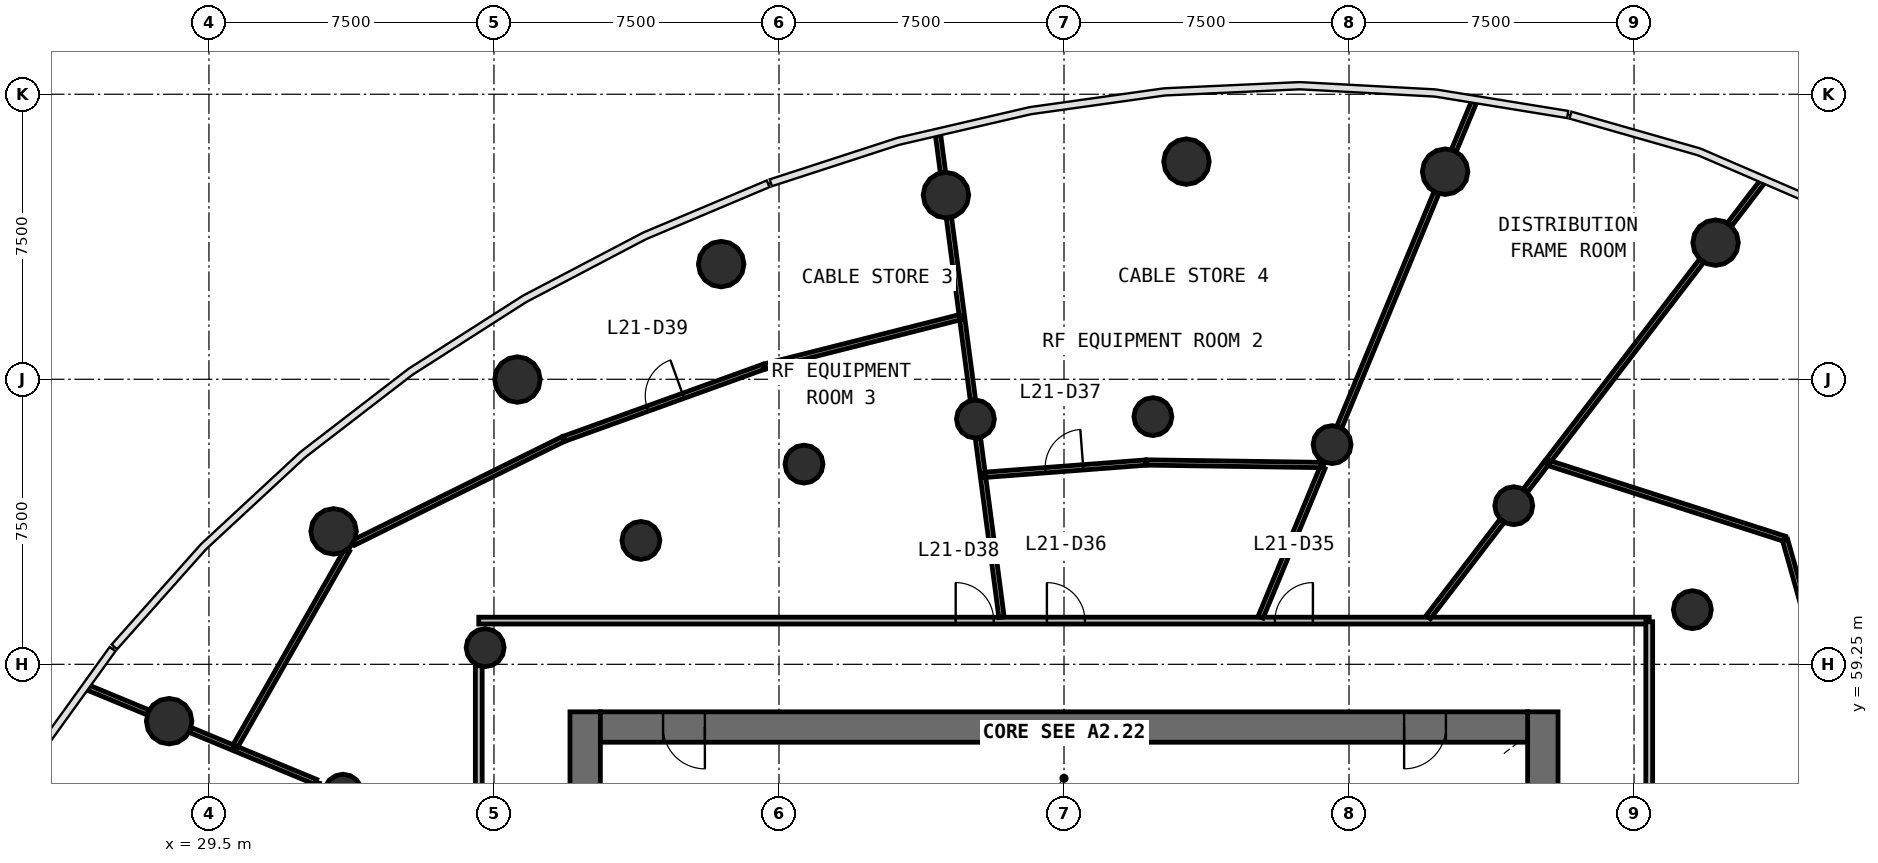
"""IFC4 building model, lengths in metres.
Left out: names, types, materials, properties, quantities, classifications, styles, units other than length and angle.
Written with IfcOpenShell. Run it as: python <this file> out.ifc"""

import sys

from ifc_helpers import new_model, si_unit, direction, frame, frame_2d, origin, origin_2d, place, context, subcontext, project, spatial, rectangle, circle, extrude, source, transform, mapped, element, fill, save


model = new_model("IFC4")
c1 = context("Model", 3, precision=1e-05, world=origin(), true_north=direction((0.0, 1.0)))
c2 = subcontext(c1, "Body", "Model", "MODEL_VIEW")
j1 = project(units=[si_unit("LENGTHUNIT", "METRE"), si_unit("PLANEANGLEUNIT", "RADIAN")], contexts=[c1])
p1 = place(None, origin())
s1 = spatial("IfcSite", under=j1, at=p1, CompositionType="ELEMENT")
p2 = place(p1, origin())
s2 = spatial("IfcBuilding", under=s1, at=p2, CompositionType="ELEMENT")
p3 = place(p2, frame((0.0, 0.0, 92.1)))
s3 = spatial("IfcBuildingStorey", under=s2, at=p3, CompositionType="ELEMENT", Elevation=92.1)
p4 = place(p3, frame((64.6, 38.0, 0.0), z_axis=(0.0, 0.0, 1.0), x_axis=(0.0, 1.0, 0.0)))
e1 = element("IfcWall", 1, at=p4, inside=s3, PredefinedType="SHEAR", context=c2, shape_type="SweptSolid", body=[
    extrude(rectangle(XDim=20.0, YDim=0.8, at=frame_2d((10.0, 0.0))), origin(), (0.0, 0.0, 1.0), 4.1),
])
p5 = place(p4, frame((9.1, 0.0, 0.0)))
e2 = element("IfcOpeningElement", 2, at=p5, cuts=e1, PredefinedType="OPENING", context=c2, shape_type="SweptSolid", body=[
    extrude(rectangle(XDim=1.8, YDim=2.1, at=frame_2d((0.9, 1.05))), frame((0.0, 0.41, 0.0), z_axis=(0.0, -1.0, 0.0), x_axis=(1.0, 0.0, 0.0)), (0.0, 0.0, 1.0), 0.82),
])
p6 = place(p3, frame((39.4, 58.0, 0.0), z_axis=(0.0, 0.0, 1.0), x_axis=(0.0, -1.0, 0.0)))
e3 = element("IfcWall", 3, at=p6, inside=s3, PredefinedType="SHEAR", context=c2, shape_type="SweptSolid", body=[
    extrude(rectangle(XDim=20.0, YDim=0.8, at=frame_2d((10.0, 0.0))), origin(), (0.0, 0.0, 1.0), 4.1),
])
p7 = place(p6, frame((9.1, 0.0, 0.0)))
e4 = element("IfcOpeningElement", 4, at=p7, cuts=e3, PredefinedType="OPENING", context=c2, shape_type="SweptSolid", body=[
    extrude(rectangle(XDim=1.8, YDim=2.1, at=frame_2d((0.9, 1.05))), frame((0.0, 0.41, 0.0), z_axis=(0.0, -1.0, 0.0), x_axis=(1.0, 0.0, 0.0)), (0.0, 0.0, 1.0), 0.82),
])
p8 = place(p3, frame((64.2, 57.6, 0.0), z_axis=(0.0, 0.0, 1.0), x_axis=(-1.0, 0.0, 0.0)))
e5 = element("IfcWall", 5, at=p8, inside=s3, PredefinedType="SHEAR", context=c2, shape_type="SweptSolid", body=[
    extrude(rectangle(XDim=24.4, YDim=0.8, at=frame_2d((12.2, 0.0))), origin(), (0.0, 0.0, 1.0), 4.1),
])
p9 = place(p8, frame((21.65, 0.0, 0.0)))
e6 = element("IfcOpeningElement", 6, at=p9, cuts=e5, PredefinedType="OPENING", context=c2, shape_type="SweptSolid", body=[
    extrude(rectangle(XDim=1.1, YDim=2.1, at=frame_2d((0.55, 1.05))), frame((0.0, 0.41, 0.0), z_axis=(0.0, -1.0, 0.0), x_axis=(1.0, 0.0, 0.0)), (0.0, 0.0, 1.0), 0.82),
])
p10 = place(p8, frame((2.15, 0.0, 0.0)))
e7 = element("IfcOpeningElement", 7, at=p10, cuts=e5, PredefinedType="OPENING", context=c2, shape_type="SweptSolid", body=[
    extrude(rectangle(XDim=1.1, YDim=2.1, at=frame_2d((0.55, 1.05))), frame((0.0, 0.41, 0.0), z_axis=(0.0, -1.0, 0.0), x_axis=(1.0, 0.0, 0.0)), (0.0, 0.0, 1.0), 0.82),
])
m1 = source(origin(), c2, "Body", "SweptSolid", [
    extrude(circle(Radius=0.6, at=origin_2d()), origin(), (0.0, 0.0, 1.0), 4.1),
])
for number, where, z_axis, x_axis in (
    (8, (69.146, 70.345, 0.0), (0.0, 0.0, 1.0), (1.0, 0.0, 0.0)),
    (9, (62.029, 72.212, 0.0), (0.0, 0.0, 1.0), (1.0, 0.0, 0.0)),
    (10, (55.222, 72.477, 0.0), (0.0, 0.0, 1.0), (1.0, 0.0, 0.0)),
    (11, (48.894, 71.595, 0.0), (0.0, 0.0, 1.0), (1.0, 0.0, 0.0)),
    (12, (42.978, 69.781, 0.0), (0.0, 0.0, 1.0), (1.0, 0.0, 0.0)),
    (13, (37.618, 66.743, 0.0), (0.0, 0.0, 1.0), (1.0, 0.0, 0.0)),
    (14, (32.78, 62.748, 0.0), (0.0, 0.0, 1.0), (1.0, 0.0, 0.0)),
    (15, (28.452, 57.754, 0.0), (0.0, 0.0, 1.0), (1.0, 0.0, 0.0)),
):
    element("IfcColumn", number, at=place(p3, frame(where, z_axis=z_axis, x_axis=x_axis)), inside=s3, PredefinedType="COLUMN", context=c2, shape_type="MappedRepresentation", body=[
        mapped(m1, transform((0.0, 0.0, 0.0), scale=1.0)),
    ])
m2 = source(origin(), c2, "Body", "SweptSolid", [
    extrude(circle(Radius=0.5, at=origin_2d()), origin(), (0.0, 0.0, 1.0), 4.1),
])
for number, where, z_axis, x_axis in (
    (16, (68.535, 60.688, 0.0), (0.0, 0.0, 1.0), (1.0, 0.0, 0.0)),
    (17, (63.835, 63.424, 0.0), (0.0, 0.0, 1.0), (1.0, 0.0, 0.0)),
    (18, (59.055, 65.031, 0.0), (0.0, 0.0, 1.0), (1.0, 0.0, 0.0)),
    (19, (54.339, 65.767, 0.0), (0.0, 0.0, 1.0), (1.0, 0.0, 0.0)),
    (20, (49.669, 65.703, 0.0), (0.0, 0.0, 1.0), (1.0, 0.0, 0.0)),
    (21, (45.158, 64.518, 0.0), (0.0, 0.0, 1.0), (1.0, 0.0, 0.0)),
    (22, (40.866, 62.51, 0.0), (0.0, 0.0, 1.0), (1.0, 0.0, 0.0)),
    (23, (36.768, 59.688, 0.0), (0.0, 0.0, 1.0), (1.0, 0.0, 0.0)),
    (24, (33.028, 55.859, 0.0), (0.0, 0.0, 1.0), (1.0, 0.0, 0.0)),
):
    element("IfcColumn", number, at=place(p3, frame(where, z_axis=z_axis, x_axis=x_axis)), inside=s3, PredefinedType="COLUMN", context=c2, shape_type="MappedRepresentation", body=[
        mapped(m2, transform((0.0, 0.0, 0.0), scale=1.0)),
    ])
p11 = place(p3, frame((36.6, 60.4, 0.0), z_axis=(0.0, 0.0, 1.0), x_axis=(1.0, 0.0, 0.0)))
e25 = element("IfcWall", 25, at=p11, inside=s3, PredefinedType="PARTITIONING", context=c2, shape_type="SweptSolid", body=[
    extrude(rectangle(XDim=30.8, YDim=0.18, at=frame_2d((15.4, 0.0))), origin(), (0.0, 0.0, 1.0), 2.9),
])
p12 = place(p11, frame((20.95, 0.0, 0.0)))
e26 = element("IfcOpeningElement", 26, at=p12, cuts=e25, PredefinedType="OPENING", context=c2, shape_type="SweptSolid", body=[
    extrude(rectangle(XDim=1.0, YDim=2.1, at=frame_2d((0.5, 1.05))), frame((0.0, 0.1, 0.0), z_axis=(0.0, -1.0, 0.0), x_axis=(1.0, 0.0, 0.0)), (0.0, 0.0, 1.0), 0.2),
])
p13 = place(p11, frame((14.95, 0.0, 0.0)))
e27 = element("IfcOpeningElement", 27, at=p13, cuts=e25, PredefinedType="OPENING", context=c2, shape_type="SweptSolid", body=[
    extrude(rectangle(XDim=1.0, YDim=2.1, at=frame_2d((0.5, 1.05))), frame((0.0, 0.1, 0.0), z_axis=(0.0, -1.0, 0.0), x_axis=(1.0, 0.0, 0.0)), (0.0, 0.0, 1.0), 0.2),
])
p14 = place(p11, frame((12.55, 0.0, 0.0)))
e28 = element("IfcOpeningElement", 28, at=p14, cuts=e25, PredefinedType="OPENING", context=c2, shape_type="SweptSolid", body=[
    extrude(rectangle(XDim=1.0, YDim=2.1, at=frame_2d((0.5, 1.05))), frame((0.0, 0.1, 0.0), z_axis=(0.0, -1.0, 0.0), x_axis=(1.0, 0.0, 0.0)), (0.0, 0.0, 1.0), 0.2),
])
p15 = place(p3, frame((67.4, 60.37, 0.0), z_axis=(0.0, 0.0, 1.0), x_axis=(0.0, -1.0, 0.0)))
e29 = element("IfcWall", 29, at=p15, inside=s3, PredefinedType="PARTITIONING", context=c2, shape_type="SweptSolid", body=[
    extrude(rectangle(XDim=23.583, YDim=0.18, at=frame_2d((11.791, 0.0))), origin(), (0.0, 0.0, 1.0), 2.9),
])
p16 = place(p15, frame((11.333, 0.0, 0.0)))
e30 = element("IfcOpeningElement", 30, at=p16, cuts=e29, PredefinedType="OPENING", context=c2, shape_type="SweptSolid", body=[
    extrude(rectangle(XDim=1.0, YDim=2.1, at=frame_2d((0.5, 1.05))), frame((0.0, 0.1, 0.0), z_axis=(0.0, -1.0, 0.0), x_axis=(1.0, 0.0, 0.0)), (0.0, 0.0, 1.0), 0.2),
])
p17 = place(p15, frame((9.133, 0.0, 0.0)))
e31 = element("IfcOpeningElement", 31, at=p17, cuts=e29, PredefinedType="OPENING", context=c2, shape_type="SweptSolid", body=[
    extrude(rectangle(XDim=1.0, YDim=2.1, at=frame_2d((0.5, 1.05))), frame((0.0, 0.1, 0.0), z_axis=(0.0, -1.0, 0.0), x_axis=(1.0, 0.0, 0.0)), (0.0, 0.0, 1.0), 0.2),
])
p18 = place(p3, frame((36.6, 35.63, 0.0), z_axis=(0.0, 0.0, 1.0), x_axis=(0.0, 1.0, 0.0)))
e32 = element("IfcWall", 32, at=p18, inside=s3, PredefinedType="PARTITIONING", context=c2, shape_type="SweptSolid", body=[
    extrude(rectangle(XDim=23.583, YDim=0.18, at=frame_2d((11.791, 0.0))), origin(), (0.0, 0.0, 1.0), 2.9),
])
p19 = place(p18, frame((11.333, 0.0, 0.0)))
e33 = element("IfcOpeningElement", 33, at=p19, cuts=e32, PredefinedType="OPENING", context=c2, shape_type="SweptSolid", body=[
    extrude(rectangle(XDim=1.0, YDim=2.1, at=frame_2d((0.5, 1.05))), frame((0.0, 0.1, 0.0), z_axis=(0.0, -1.0, 0.0), x_axis=(1.0, 0.0, 0.0)), (0.0, 0.0, 1.0), 0.2),
])
p20 = place(p18, frame((4.532, 0.0, 0.0)))
e34 = element("IfcOpeningElement", 34, at=p20, cuts=e32, PredefinedType="OPENING", context=c2, shape_type="SweptSolid", body=[
    extrude(rectangle(XDim=1.0, YDim=2.1, at=frame_2d((0.5, 1.05))), frame((0.0, 0.1, 0.0), z_axis=(0.0, -1.0, 0.0), x_axis=(1.0, 0.0, 0.0)), (0.0, 0.0, 1.0), 0.2),
])
p21 = place(p3, frame((64.708, 64.561, 0.0), z_axis=(0.0, 0.0, 1.0), x_axis=(0.608727396298, 0.793379453349, 0.0)))
e35 = element("IfcWall", 35, at=p21, inside=s3, PredefinedType="PARTITIONING", context=c2, shape_type="SweptSolid", body=[
    extrude(rectangle(XDim=6.686, YDim=0.14, at=frame_2d((3.343, 0.0))), origin(), (0.0, 0.0, 1.0), 2.9),
])
p22 = place(p3, frame((59.248, 65.498, 0.0), z_axis=(0.0, 0.0, 1.0), x_axis=(0.382696989205, 0.923873916968, 0.0)))
e36 = element("IfcWall", 36, at=p22, inside=s3, PredefinedType="PARTITIONING", context=c2, shape_type="SweptSolid", body=[
    extrude(rectangle(XDim=6.663, YDim=0.14, at=frame_2d((3.332, 0.0))), origin(), (0.0, 0.0, 1.0), 2.9),
])
p23 = place(p3, frame((70.966, 62.553, 0.0), z_axis=(0.0, 0.0, 1.0), x_axis=(-0.952177784747, 0.305544540508, 0.0)))
e37 = element("IfcWall", 37, at=p23, inside=s3, PredefinedType="PARTITIONING", context=c2, shape_type="SweptSolid", body=[
    extrude(rectangle(XDim=6.498, YDim=0.14, at=frame_2d((3.249, 0.0))), origin(), (0.0, 0.0, 1.0), 2.9),
])
p24 = place(p3, frame((38.821, 65.175, 0.0), z_axis=(0.0, 0.0, 1.0), x_axis=(-0.896426018312, -0.443193404388, 0.0)))
e38 = element("IfcWall", 38, at=p24, inside=s3, PredefinedType="PARTITIONING", context=c2, shape_type="SweptSolid", body=[
    extrude(rectangle(XDim=6.153, YDim=0.14, at=frame_2d((3.076, 0.0))), origin(), (0.0, 0.0, 1.0), 2.9),
])
p25 = place(p3, frame((33.14, 62.263, 0.0), z_axis=(0.0, 0.0, 1.0), x_axis=(-0.495587358923, -0.868558098043, 0.0)))
e39 = element("IfcWall", 39, at=p25, inside=s3, PredefinedType="PARTITIONING", context=c2, shape_type="SweptSolid", body=[
    extrude(rectangle(XDim=6.007, YDim=0.14, at=frame_2d((3.003, 0.0))), origin(), (0.0, 0.0, 1.0), 2.9),
])
p26 = place(p3, frame((72.522, 57.04, 0.0), z_axis=(0.0, 0.0, 1.0), x_axis=(-0.27165858213, 0.962393690106, 0.0)))
e40 = element("IfcWall", 40, at=p26, inside=s3, PredefinedType="PARTITIONING", context=c2, shape_type="SweptSolid", body=[
    extrude(rectangle(XDim=5.699, YDim=0.14, at=frame_2d((2.849, 0.0))), origin(), (0.0, 0.0, 1.0), 2.9),
])
p27 = place(p3, frame((38.849, 65.186, 0.0), z_axis=(0.0, 0.0, 1.0), x_axis=(0.940690895338, 0.339264851447, 0.0)))
e41 = element("IfcWall", 41, at=p27, inside=s3, PredefinedType="PARTITIONING", context=c2, shape_type="SweptSolid", body=[
    extrude(rectangle(XDim=5.579, YDim=0.14, at=frame_2d((2.79, 0.0))), origin(), (0.0, 0.0, 1.0), 2.9),
])
p28 = place(p27, frame((2.329, 0.0, 0.0)))
e42 = element("IfcOpeningElement", 42, at=p28, cuts=e41, PredefinedType="OPENING", context=c2, shape_type="SweptSolid", body=[
    extrude(rectangle(XDim=1.0, YDim=2.1, at=frame_2d((0.5, 1.05))), frame((0.0, 0.08, 0.0), z_axis=(0.0, -1.0, 0.0), x_axis=(1.0, 0.0, 0.0)), (0.0, 0.0, 1.0), 0.16),
])
p29 = place(p3, frame((30.753, 50.827, 0.0), z_axis=(0.0, 0.0, 1.0), x_axis=(0.28557117519, 0.95835750318, 0.0)))
e43 = element("IfcWall", 43, at=p29, inside=s3, PredefinedType="PARTITIONING", context=c2, shape_type="SweptSolid", body=[
    extrude(rectangle(XDim=5.548, YDim=0.14, at=frame_2d((2.774, 0.0))), origin(), (0.0, 0.0, 1.0), 2.9),
])
p30 = place(p29, frame((2.299, 0.0, 0.0)))
e44 = element("IfcOpeningElement", 44, at=p30, cuts=e43, PredefinedType="OPENING", context=c2, shape_type="SweptSolid", body=[
    extrude(rectangle(XDim=1.0, YDim=2.1, at=frame_2d((0.5, 1.05))), frame((0.0, 0.08, 0.0), z_axis=(0.0, -1.0, 0.0), x_axis=(1.0, 0.0, 0.0)), (0.0, 0.0, 1.0), 0.16),
])
p31 = place(p3, frame((49.315, 68.396, 0.0), z_axis=(0.0, 0.0, 1.0), x_axis=(-0.969532921221, -0.244961047249, 0.0)))
e45 = element("IfcWall", 45, at=p31, inside=s3, PredefinedType="PARTITIONING", context=c2, shape_type="SweptSolid", body=[
    extrude(rectangle(XDim=5.351, YDim=0.14, at=frame_2d((2.676, 0.0))), origin(), (0.0, 0.0, 1.0), 2.9),
])
p32 = place(p3, frame((58.832, 64.494, 0.0), z_axis=(0.0, 0.0, 1.0), x_axis=(-0.999897374303, 0.01432622983, 0.0)))
e46 = element("IfcWall", 46, at=p32, inside=s3, PredefinedType="PARTITIONING", context=c2, shape_type="SweptSolid", body=[
    extrude(rectangle(XDim=4.652, YDim=0.14, at=frame_2d((2.326, 0.0))), origin(), (0.0, 0.0, 1.0), 2.9),
])
p33 = place(p3, frame((57.174, 60.49, 0.0), z_axis=(0.0, 0.0, 1.0), x_axis=(0.38268090941, 0.923880577549, 0.0)))
e47 = element("IfcWall", 47, at=p33, inside=s3, PredefinedType="PARTITIONING", context=c2, shape_type="SweptSolid", body=[
    extrude(rectangle(XDim=4.259, YDim=0.14, at=frame_2d((2.129, 0.0))), origin(), (0.0, 0.0, 1.0), 2.9),
])
p34 = place(p3, frame((49.863, 64.232, 0.0), z_axis=(0.0, 0.0, 1.0), x_axis=(0.997114299224, 0.075914914758, 0.0)))
e48 = element("IfcWall", 48, at=p34, inside=s3, PredefinedType="PARTITIONING", context=c2, shape_type="SweptSolid", body=[
    extrude(rectangle(XDim=4.3, YDim=0.14, at=frame_2d((2.15, 0.0))), origin(), (0.0, 0.0, 1.0), 2.9),
])
p35 = place(p34, frame((1.65, 0.0, 0.0)))
e49 = element("IfcOpeningElement", 49, at=p35, cuts=e48, PredefinedType="OPENING", context=c2, shape_type="SweptSolid", body=[
    extrude(rectangle(XDim=1.0, YDim=2.1, at=frame_2d((0.5, 1.05))), frame((0.0, 0.08, 0.0), z_axis=(0.0, -1.0, 0.0), x_axis=(1.0, 0.0, 0.0)), (0.0, 0.0, 1.0), 0.16),
])
p36 = place(p3, frame((50.356, 60.49, 0.0), z_axis=(0.0, 0.0, 1.0), x_axis=(-0.130497134821, 0.99144868642, 0.0)))
e50 = element("IfcWall", 50, at=p36, inside=s3, PredefinedType="PARTITIONING", context=c2, shape_type="SweptSolid", body=[
    extrude(rectangle(XDim=3.704, YDim=0.14, at=frame_2d((1.852, 0.0))), origin(), (0.0, 0.0, 1.0), 2.9),
])
p37 = place(p3, frame((61.584, 60.49, 0.0), z_axis=(0.0, 0.0, 1.0), x_axis=(0.60874605662, 0.793365135703, 0.0)))
e51 = element("IfcWall", 51, at=p37, inside=s3, PredefinedType="PARTITIONING", context=c2, shape_type="SweptSolid", body=[
    extrude(rectangle(XDim=3.194, YDim=0.14, at=frame_2d((1.597, 0.0))), origin(), (0.0, 0.0, 1.0), 2.9),
])
p38 = place(p3, frame((49.311, 68.426, 0.0), z_axis=(0.0, 0.0, 1.0), x_axis=(-0.13054709887, 0.991442108737, 0.0)))
e52 = element("IfcWall", 52, at=p38, inside=s3, PredefinedType="PARTITIONING", context=c2, shape_type="SweptSolid", body=[
    extrude(rectangle(XDim=2.592, YDim=0.14, at=frame_2d((1.296, 0.0))), origin(), (0.0, 0.0, 1.0), 2.9),
])
p39 = place(p3, frame((32.31, 56.156, 0.0), z_axis=(0.0, 0.0, 1.0), x_axis=(-0.923901937079, 0.382629338474, 0.0)))
e53 = element("IfcWall", 53, at=p39, inside=s3, PredefinedType="PARTITIONING", context=c2, shape_type="SweptSolid", body=[
    extrude(rectangle(XDim=2.253, YDim=0.14, at=frame_2d((1.126, 0.0))), origin(), (0.0, 0.0, 1.0), 2.9),
])
p40 = place(p3, frame((49.604, 66.203, 0.0), z_axis=(0.0, 0.0, 1.0), x_axis=(-0.130513483775, 0.991446534389, 0.0)))
e54 = element("IfcWall", 54, at=p40, inside=s3, PredefinedType="PARTITIONING", context=c2, shape_type="SweptSolid", body=[
    extrude(rectangle(XDim=2.142, YDim=0.14, at=frame_2d((1.071, 0.0))), origin(), (0.0, 0.0, 1.0), 2.9),
])
p41 = place(p3, frame((27.893, 57.985, 0.0), z_axis=(0.0, 0.0, 1.0), x_axis=(-0.92390514321, 0.382621596816, 0.0)))
e55 = element("IfcWall", 55, at=p41, inside=s3, PredefinedType="PARTITIONING", context=c2, shape_type="SweptSolid", body=[
    extrude(rectangle(XDim=1.705, YDim=0.14, at=frame_2d((0.853, 0.0))), origin(), (0.0, 0.0, 1.0), 2.9),
])
p42 = place(p3, frame((69.514, 70.824, 0.0), z_axis=(0.0, 0.0, 1.0), x_axis=(0.608818785139, 0.79330932609, 0.0)))
e56 = element("IfcWall", 56, at=p42, inside=s3, PredefinedType="PARTITIONING", context=c2, shape_type="SweptSolid", body=[
    extrude(rectangle(XDim=1.429, YDim=0.14, at=frame_2d((0.715, 0.0))), origin(), (0.0, 0.0, 1.0), 2.9),
])
p43 = place(p3, frame((62.26, 72.771, 0.0), z_axis=(0.0, 0.0, 1.0), x_axis=(0.382705825988, 0.923870256451, 0.0)))
e57 = element("IfcWall", 57, at=p43, inside=s3, PredefinedType="PARTITIONING", context=c2, shape_type="SweptSolid", body=[
    extrude(rectangle(XDim=1.38, YDim=0.14, at=frame_2d((0.69, 0.0))), origin(), (0.0, 0.0, 1.0), 2.9),
])
p44 = place(p3, frame((30.135, 57.057, 0.0), z_axis=(0.0, 0.0, 1.0), x_axis=(-0.923911694708, 0.382605776723, 0.0)))
e58 = element("IfcWall", 58, at=p44, inside=s3, PredefinedType="PARTITIONING", context=c2, shape_type="SweptSolid", body=[
    extrude(rectangle(XDim=1.217, YDim=0.14, at=frame_2d((0.608, 0.0))), origin(), (0.0, 0.0, 1.0), 2.9),
])
p45 = place(p3, frame((48.815, 72.195, 0.0), z_axis=(0.0, 0.0, 1.0), x_axis=(-0.130576058812, 0.991438295037, 0.0)))
e59 = element("IfcWall", 59, at=p45, inside=s3, PredefinedType="PARTITIONING", context=c2, shape_type="SweptSolid", body=[
    extrude(rectangle(XDim=0.987, YDim=0.14, at=frame_2d((0.494, 0.0))), origin(), (0.0, 0.0, 1.0), 2.9),
])
p46 = place(p3, frame((49.859, 64.262, 0.0), z_axis=(0.0, 0.0, 1.0), x_axis=(-0.130614135366, 0.991433279471, 0.0)))
e60 = element("IfcWall", 60, at=p46, inside=s3, PredefinedType="PARTITIONING", context=c2, shape_type="SweptSolid", body=[
    extrude(rectangle(XDim=0.949, YDim=0.14, at=frame_2d((0.475, 0.0))), origin(), (0.0, 0.0, 1.0), 2.9),
])
p47 = place(p3, frame((64.142, 63.824, 0.0), z_axis=(0.0, 0.0, 1.0), x_axis=(0.608870455138, 0.793269669696, 0.0)))
e61 = element("IfcWall", 61, at=p47, inside=s3, PredefinedType="PARTITIONING", context=c2, shape_type="SweptSolid", body=[
    extrude(rectangle(XDim=0.899, YDim=0.14, at=frame_2d((0.449, 0.0))), origin(), (0.0, 0.0, 1.0), 2.9),
])
m3 = source(origin(), c2, "Body", "SweptSolid", [
    extrude(rectangle(XDim=1.1, YDim=2.1, at=frame_2d((0.55, 1.05))), frame((0.0, 0.025, 0.0), z_axis=(0.0, -1.0, 0.0), x_axis=(1.0, 0.0, 0.0)), (0.0, 0.0, 1.0), 0.05),
])
p48 = place(p9, origin())
e62 = element("IfcDoor", 62, at=p48, inside=s3, OperationType="SINGLE_SWING_LEFT", PredefinedType="DOOR", context=c2, shape_type="MappedRepresentation", body=[
    mapped(m3, transform((0.0, 0.0, 0.0), scale=1.0)),
])
fill(e6, e62)
p49 = place(p10, origin())
e63 = element("IfcDoor", 63, at=p49, inside=s3, OperationType="SINGLE_SWING_RIGHT", PredefinedType="DOOR", context=c2, shape_type="MappedRepresentation", body=[
    mapped(m3, transform((0.0, 0.0, 0.0), scale=1.0)),
])
fill(e7, e63)
m4 = source(origin(), c2, "Body", "SweptSolid", [
    extrude(rectangle(XDim=1.0, YDim=2.1, at=frame_2d((0.5, 1.05))), frame((0.0, 0.025, 0.0), z_axis=(0.0, -1.0, 0.0), x_axis=(1.0, 0.0, 0.0)), (0.0, 0.0, 1.0), 0.05),
])
p50 = place(p12, origin())
e64 = element("IfcDoor", 64, at=p50, inside=s3, OperationType="SINGLE_SWING_RIGHT", PredefinedType="DOOR", context=c2, shape_type="MappedRepresentation", body=[
    mapped(m4, transform((0.0, 0.0, 0.0), scale=1.0)),
])
fill(e26, e64)
p51 = place(p13, origin())
e65 = element("IfcDoor", 65, at=p51, inside=s3, OperationType="SINGLE_SWING_LEFT", PredefinedType="DOOR", context=c2, shape_type="MappedRepresentation", body=[
    mapped(m4, transform((0.0, 0.0, 0.0), scale=1.0)),
])
fill(e27, e65)
p52 = place(p35, origin())
e66 = element("IfcDoor", 66, at=p52, inside=s3, OperationType="SINGLE_SWING_RIGHT", PredefinedType="DOOR", context=c2, shape_type="MappedRepresentation", body=[
    mapped(m4, transform((0.0, 0.0, 0.0), scale=1.0)),
])
fill(e49, e66)
p53 = place(p14, origin())
e67 = element("IfcDoor", 67, at=p53, inside=s3, OperationType="SINGLE_SWING_LEFT", PredefinedType="DOOR", context=c2, shape_type="MappedRepresentation", body=[
    mapped(m4, transform((0.0, 0.0, 0.0), scale=1.0)),
])
fill(e28, e67)
p54 = place(p28, origin())
e68 = element("IfcDoor", 68, at=p54, inside=s3, OperationType="SINGLE_SWING_RIGHT", PredefinedType="DOOR", context=c2, shape_type="MappedRepresentation", body=[
    mapped(m4, transform((0.0, 0.0, 0.0), scale=1.0)),
])
fill(e42, e68)
save(model, sys.argv[1])
